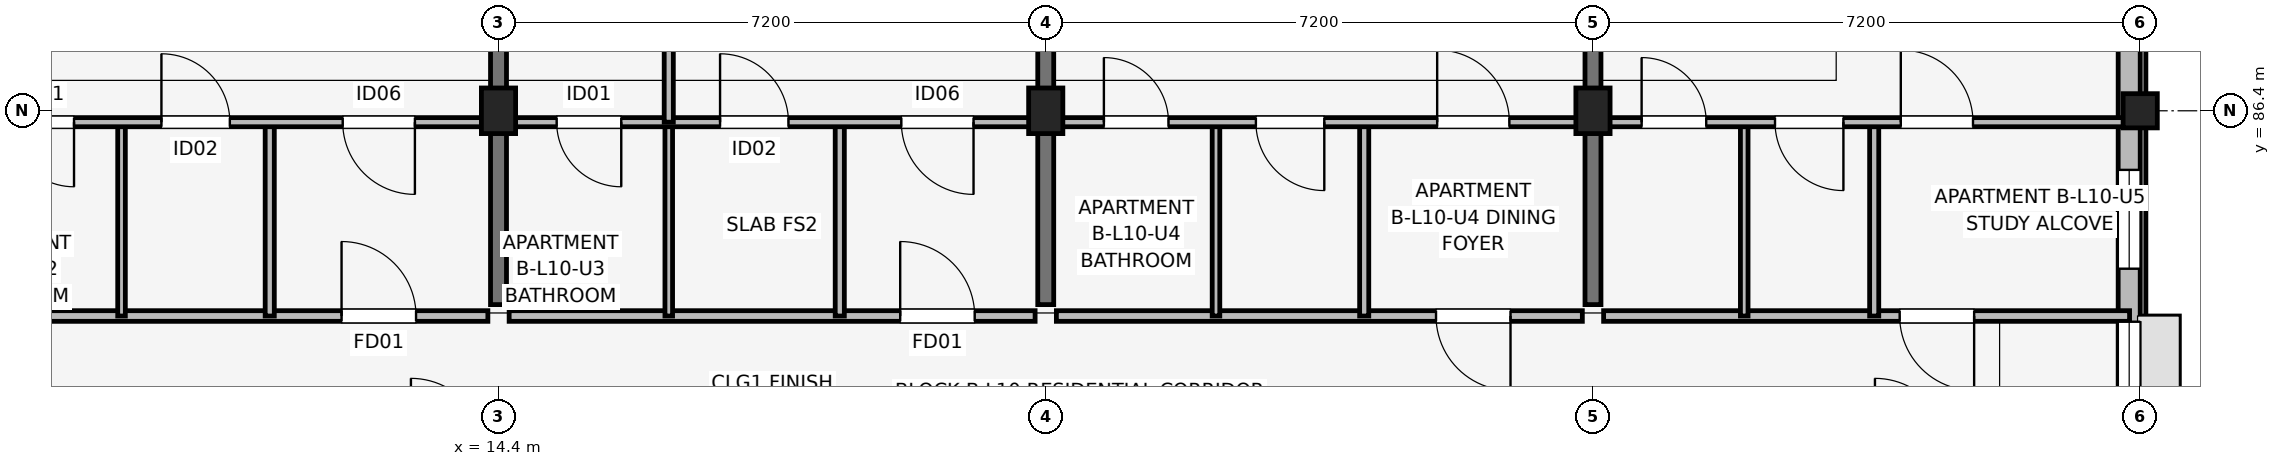
"""IFC4 building model, lengths in metres.
Left out: names, types, materials, properties, quantities, classifications, styles, units other than length and angle.
Written with IfcOpenShell. Run it as: python <this file> out.ifc"""

import sys

from ifc_helpers import new_model, si_unit, direction, frame, frame_2d, origin, origin_2d, place, context, subcontext, project, spatial, rectangle, extrude, element, fill, save


model = new_model("IFC4")
c1 = context("Model", 3, precision=1e-05, world=origin(), true_north=direction((0.0, 1.0)))
c2 = subcontext(c1, "Body", "Model", "MODEL_VIEW")
j1 = project(units=[si_unit("LENGTHUNIT", "METRE"), si_unit("PLANEANGLEUNIT", "RADIAN")], contexts=[c1])
p1 = place(None, origin())
s1 = spatial("IfcSite", under=j1, at=p1, CompositionType="ELEMENT")
p2 = place(p1, origin())
s2 = spatial("IfcBuilding", under=s1, at=p2, CompositionType="ELEMENT")
p3 = place(p2, frame((0.0, 0.0, 33.9)))
s3 = spatial("IfcBuildingStorey", under=s2, at=p3, CompositionType="ELEMENT", Elevation=33.9)
for number, where, z_axis, x_axis in (
    (1, (14.4, 86.4, 0.0), (0.0, 0.0, 1.0), (1.0, 0.0, 0.0)),
    (2, (21.6, 86.4, 0.0), (0.0, 0.0, 1.0), (1.0, 0.0, 0.0)),
    (3, (28.8, 86.4, 0.0), (0.0, 0.0, 1.0), (1.0, 0.0, 0.0)),
):
    element("IfcColumn", number, at=place(p3, frame(where, z_axis=z_axis, x_axis=x_axis)), inside=s3, PredefinedType="COLUMN", context=c2, shape_type="SweptSolid", body=[
        extrude(rectangle(XDim=0.45, YDim=0.6, at=origin_2d()), origin(), (0.0, 0.0, 1.0), 3.15),
    ])
p4 = place(p3, frame((36.0, 86.4, 0.0), z_axis=(0.0, 0.0, 1.0), x_axis=(1.0, 0.0, 0.0)))
e4 = element("IfcColumn", 4, at=p4, inside=s3, PredefinedType="COLUMN", context=c2, shape_type="SweptSolid", body=[
    extrude(rectangle(XDim=0.45, YDim=0.45, at=origin_2d()), origin(), (0.0, 0.0, 1.0), 3.15),
])
for number, where, z_axis, x_axis in (
    (5, (14.4, 83.85, 0.0), (0.0, 0.0, 1.0), (0.0, 1.0, 0.0)),
    (6, (21.6, 83.85, 0.0), (0.0, 0.0, 1.0), (0.0, 1.0, 0.0)),
    (7, (28.8, 83.85, 0.0), (0.0, 0.0, 1.0), (0.0, 1.0, 0.0)),
):
    element("IfcWall", number, at=place(p3, frame(where, z_axis=z_axis, x_axis=x_axis)), inside=s3, PredefinedType="SHEAR", context=c2, shape_type="SweptSolid", body=[
        extrude(rectangle(XDim=6.4, YDim=0.21, at=frame_2d((3.2, 0.0))), origin(), (0.0, 0.0, 1.0), 3.15),
    ])
p5 = place(p3, frame((35.855, 74.4, 0.0), z_axis=(0.0, 0.0, 1.0), x_axis=(0.0, 1.0, 0.0)))
e8 = element("IfcWall", 8, at=p5, inside=s3, PredefinedType="SOLIDWALL", context=c2, shape_type="SweptSolid", body=[
    extrude(rectangle(XDim=13.8, YDim=0.29, at=frame_2d((6.9, 0.0))), origin(), (0.0, 0.0, 1.0), 2.48),
])
p6 = place(p5, frame((7.575, 0.0, 1.05)))
e9 = element("IfcOpeningElement", 9, at=p6, cuts=e8, PredefinedType="OPENING", context=c2, shape_type="SweptSolid", body=[
    extrude(rectangle(XDim=1.65, YDim=1.15, at=frame_2d((0.825, 0.575))), frame((0.0, 0.155, 0.0), z_axis=(0.0, -1.0, 0.0), x_axis=(1.0, 0.0, 0.0)), (0.0, 0.0, 1.0), 0.31),
])
p7 = place(p5, frame((9.923, 0.0, 0.75)))
e10 = element("IfcOpeningElement", 10, at=p7, cuts=e8, PredefinedType="OPENING", context=c2, shape_type="SweptSolid", body=[
    extrude(rectangle(XDim=1.3, YDim=1.55, at=frame_2d((0.65, 0.775))), frame((0.0, 0.155, 0.0), z_axis=(0.0, -1.0, 0.0), x_axis=(1.0, 0.0, 0.0)), (0.0, 0.0, 1.0), 0.31),
])
p8 = place(p3, frame((7.34, 83.7, 0.0), z_axis=(0.0, 0.0, 1.0), x_axis=(1.0, 0.0, 0.0)))
e11 = element("IfcWall", 11, at=p8, inside=s3, PredefinedType="PARTITIONING", context=c2, shape_type="SweptSolid", body=[
    extrude(rectangle(XDim=6.92, YDim=0.14, at=frame_2d((3.46, 0.0))), origin(), (0.0, 0.0, 1.0), 2.38),
])
p9 = place(p8, frame((4.995, 0.0, 0.0)))
e12 = element("IfcOpeningElement", 12, at=p9, cuts=e11, PredefinedType="OPENING", context=c2, shape_type="SweptSolid", body=[
    extrude(rectangle(XDim=0.98, YDim=2.1, at=frame_2d((0.49, 1.05))), frame((0.0, 0.08, 0.0), z_axis=(0.0, -1.0, 0.0), x_axis=(1.0, 0.0, 0.0)), (0.0, 0.0, 1.0), 0.16),
])
p10 = place(p3, frame((9.44, 83.7, 0.0), z_axis=(0.0, 0.0, 1.0), x_axis=(0.0, 1.0, 0.0)))
e13 = element("IfcWall", 13, at=p10, inside=s3, PredefinedType="PARTITIONING", context=c2, shape_type="SweptSolid", body=[
    extrude(rectangle(XDim=2.55, YDim=0.1, at=frame_2d((1.275, 0.0))), origin(), (0.0, 0.0, 1.0), 2.38),
])
p11 = place(p3, frame((11.39, 83.7, 0.0), z_axis=(0.0, 0.0, 1.0), x_axis=(0.0, 1.0, 0.0)))
e14 = element("IfcWall", 14, at=p11, inside=s3, PredefinedType="PARTITIONING", context=c2, shape_type="SweptSolid", body=[
    extrude(rectangle(XDim=2.55, YDim=0.12, at=frame_2d((1.275, 0.0))), origin(), (0.0, 0.0, 1.0), 2.38),
])
p12 = place(p3, frame((7.34, 86.25, 0.0), z_axis=(0.0, 0.0, 1.0), x_axis=(1.0, 0.0, 0.0)))
e15 = element("IfcWall", 15, at=p12, inside=s3, PredefinedType="PARTITIONING", context=c2, shape_type="SweptSolid", body=[
    extrude(rectangle(XDim=6.92, YDim=0.12, at=frame_2d((3.46, 0.0))), origin(), (0.0, 0.0, 1.0), 2.38),
])
p13 = place(p12, frame((1.475, 0.0, 0.0), z_axis=(0.0, 0.0, 1.0), x_axis=(-1.0, 0.0, 0.0)))
e16 = element("IfcOpeningElement", 16, at=p13, cuts=e15, PredefinedType="OPENING", context=c2, shape_type="SweptSolid", body=[
    extrude(rectangle(XDim=0.85, YDim=2.08, at=frame_2d((0.425, 1.04))), frame((0.0, 0.07, 0.0), z_axis=(0.0, -1.0, 0.0), x_axis=(1.0, 0.0, 0.0)), (0.0, 0.0, 1.0), 0.14),
])
p14 = place(p12, frame((2.625, 0.0, 0.0)))
e17 = element("IfcOpeningElement", 17, at=p14, cuts=e15, PredefinedType="OPENING", context=c2, shape_type="SweptSolid", body=[
    extrude(rectangle(XDim=0.9, YDim=2.08, at=frame_2d((0.45, 1.04))), frame((0.0, 0.07, 0.0), z_axis=(0.0, -1.0, 0.0), x_axis=(1.0, 0.0, 0.0)), (0.0, 0.0, 1.0), 0.14),
])
p15 = place(p12, frame((5.96, 0.0, 0.0), z_axis=(0.0, 0.0, 1.0), x_axis=(-1.0, 0.0, 0.0)))
e18 = element("IfcOpeningElement", 18, at=p15, cuts=e15, PredefinedType="OPENING", context=c2, shape_type="SweptSolid", body=[
    extrude(rectangle(XDim=0.95, YDim=2.08, at=frame_2d((0.475, 1.04))), frame((0.0, 0.07, 0.0), z_axis=(0.0, -1.0, 0.0), x_axis=(1.0, 0.0, 0.0)), (0.0, 0.0, 1.0), 0.14),
])
p16 = place(p3, frame((14.54, 83.7, 0.0), z_axis=(0.0, 0.0, 1.0), x_axis=(1.0, 0.0, 0.0)))
e19 = element("IfcWall", 19, at=p16, inside=s3, PredefinedType="PARTITIONING", context=c2, shape_type="SweptSolid", body=[
    extrude(rectangle(XDim=6.92, YDim=0.14, at=frame_2d((3.46, 0.0))), origin(), (0.0, 0.0, 1.0), 2.38),
])
p17 = place(p16, frame((5.145, 0.0, 0.0)))
e20 = element("IfcOpeningElement", 20, at=p17, cuts=e19, PredefinedType="OPENING", context=c2, shape_type="SweptSolid", body=[
    extrude(rectangle(XDim=0.98, YDim=2.1, at=frame_2d((0.49, 1.05))), frame((0.0, 0.08, 0.0), z_axis=(0.0, -1.0, 0.0), x_axis=(1.0, 0.0, 0.0)), (0.0, 0.0, 1.0), 0.16),
])
p18 = place(p3, frame((16.64, 83.7, 0.0), z_axis=(0.0, 0.0, 1.0), x_axis=(0.0, 1.0, 0.0)))
e21 = element("IfcWall", 21, at=p18, inside=s3, PredefinedType="PARTITIONING", context=c2, shape_type="SweptSolid", body=[
    extrude(rectangle(XDim=2.55, YDim=0.1, at=frame_2d((1.275, 0.0))), origin(), (0.0, 0.0, 1.0), 2.38),
])
p19 = place(p3, frame((18.89, 83.7, 0.0), z_axis=(0.0, 0.0, 1.0), x_axis=(0.0, 1.0, 0.0)))
e22 = element("IfcWall", 22, at=p19, inside=s3, PredefinedType="PARTITIONING", context=c2, shape_type="SweptSolid", body=[
    extrude(rectangle(XDim=2.55, YDim=0.12, at=frame_2d((1.275, 0.0))), origin(), (0.0, 0.0, 1.0), 2.38),
])
p20 = place(p3, frame((14.54, 86.25, 0.0), z_axis=(0.0, 0.0, 1.0), x_axis=(1.0, 0.0, 0.0)))
e23 = element("IfcWall", 23, at=p20, inside=s3, PredefinedType="PARTITIONING", context=c2, shape_type="SweptSolid", body=[
    extrude(rectangle(XDim=6.92, YDim=0.12, at=frame_2d((3.46, 0.0))), origin(), (0.0, 0.0, 1.0), 2.38),
])
p21 = place(p20, frame((1.475, 0.0, 0.0), z_axis=(0.0, 0.0, 1.0), x_axis=(-1.0, 0.0, 0.0)))
e24 = element("IfcOpeningElement", 24, at=p21, cuts=e23, PredefinedType="OPENING", context=c2, shape_type="SweptSolid", body=[
    extrude(rectangle(XDim=0.85, YDim=2.08, at=frame_2d((0.425, 1.04))), frame((0.0, 0.07, 0.0), z_axis=(0.0, -1.0, 0.0), x_axis=(1.0, 0.0, 0.0)), (0.0, 0.0, 1.0), 0.14),
])
p22 = place(p20, frame((2.775, 0.0, 0.0)))
e25 = element("IfcOpeningElement", 25, at=p22, cuts=e23, PredefinedType="OPENING", context=c2, shape_type="SweptSolid", body=[
    extrude(rectangle(XDim=0.9, YDim=2.08, at=frame_2d((0.45, 1.04))), frame((0.0, 0.07, 0.0), z_axis=(0.0, -1.0, 0.0), x_axis=(1.0, 0.0, 0.0)), (0.0, 0.0, 1.0), 0.14),
])
p23 = place(p20, frame((6.11, 0.0, 0.0), z_axis=(0.0, 0.0, 1.0), x_axis=(-1.0, 0.0, 0.0)))
e26 = element("IfcOpeningElement", 26, at=p23, cuts=e23, PredefinedType="OPENING", context=c2, shape_type="SweptSolid", body=[
    extrude(rectangle(XDim=0.95, YDim=2.08, at=frame_2d((0.475, 1.04))), frame((0.0, 0.07, 0.0), z_axis=(0.0, -1.0, 0.0), x_axis=(1.0, 0.0, 0.0)), (0.0, 0.0, 1.0), 0.14),
])
p24 = place(p3, frame((16.64, 86.25, 0.0), z_axis=(0.0, 0.0, 1.0), x_axis=(0.0, 1.0, 0.0)))
e27 = element("IfcWall", 27, at=p24, inside=s3, PredefinedType="PARTITIONING", context=c2, shape_type="SweptSolid", body=[
    extrude(rectangle(XDim=4.05, YDim=0.12, at=frame_2d((2.025, 0.0))), origin(), (0.0, 0.0, 1.0), 2.38),
])
p25 = place(p24, frame((1.575, 0.0, 0.0)))
e28 = element("IfcOpeningElement", 28, at=p25, cuts=e27, PredefinedType="OPENING", context=c2, shape_type="SweptSolid", body=[
    extrude(rectangle(XDim=0.9, YDim=2.08, at=frame_2d((0.45, 1.04))), frame((0.0, 0.07, 0.0), z_axis=(0.0, -1.0, 0.0), x_axis=(1.0, 0.0, 0.0)), (0.0, 0.0, 1.0), 0.14),
])
p26 = place(p3, frame((21.74, 83.7, 0.0), z_axis=(0.0, 0.0, 1.0), x_axis=(1.0, 0.0, 0.0)))
e29 = element("IfcWall", 29, at=p26, inside=s3, PredefinedType="PARTITIONING", context=c2, shape_type="SweptSolid", body=[
    extrude(rectangle(XDim=6.92, YDim=0.14, at=frame_2d((3.46, 0.0))), origin(), (0.0, 0.0, 1.0), 2.38),
])
p27 = place(p26, frame((5.975, 0.0, 0.0), z_axis=(0.0, 0.0, 1.0), x_axis=(-1.0, 0.0, 0.0)))
e30 = element("IfcOpeningElement", 30, at=p27, cuts=e29, PredefinedType="OPENING", context=c2, shape_type="SweptSolid", body=[
    extrude(rectangle(XDim=0.98, YDim=2.1, at=frame_2d((0.49, 1.05))), frame((0.0, 0.08, 0.0), z_axis=(0.0, -1.0, 0.0), x_axis=(1.0, 0.0, 0.0)), (0.0, 0.0, 1.0), 0.16),
])
p28 = place(p3, frame((23.84, 83.7, 0.0), z_axis=(0.0, 0.0, 1.0), x_axis=(0.0, 1.0, 0.0)))
e31 = element("IfcWall", 31, at=p28, inside=s3, PredefinedType="PARTITIONING", context=c2, shape_type="SweptSolid", body=[
    extrude(rectangle(XDim=2.55, YDim=0.1, at=frame_2d((1.275, 0.0))), origin(), (0.0, 0.0, 1.0), 2.38),
])
p29 = place(p3, frame((25.79, 83.7, 0.0), z_axis=(0.0, 0.0, 1.0), x_axis=(0.0, 1.0, 0.0)))
e32 = element("IfcWall", 32, at=p29, inside=s3, PredefinedType="PARTITIONING", context=c2, shape_type="SweptSolid", body=[
    extrude(rectangle(XDim=2.55, YDim=0.12, at=frame_2d((1.275, 0.0))), origin(), (0.0, 0.0, 1.0), 2.38),
])
p30 = place(p3, frame((21.74, 86.25, 0.0), z_axis=(0.0, 0.0, 1.0), x_axis=(1.0, 0.0, 0.0)))
e33 = element("IfcWall", 33, at=p30, inside=s3, PredefinedType="PARTITIONING", context=c2, shape_type="SweptSolid", body=[
    extrude(rectangle(XDim=6.92, YDim=0.12, at=frame_2d((3.46, 0.0))), origin(), (0.0, 0.0, 1.0), 2.38),
])
p31 = place(p30, frame((0.625, 0.0, 0.0)))
e34 = element("IfcOpeningElement", 34, at=p31, cuts=e33, PredefinedType="OPENING", context=c2, shape_type="SweptSolid", body=[
    extrude(rectangle(XDim=0.85, YDim=2.08, at=frame_2d((0.425, 1.04))), frame((0.0, 0.07, 0.0), z_axis=(0.0, -1.0, 0.0), x_axis=(1.0, 0.0, 0.0)), (0.0, 0.0, 1.0), 0.14),
])
p32 = place(p30, frame((3.525, 0.0, 0.0), z_axis=(0.0, 0.0, 1.0), x_axis=(-1.0, 0.0, 0.0)))
e35 = element("IfcOpeningElement", 35, at=p32, cuts=e33, PredefinedType="OPENING", context=c2, shape_type="SweptSolid", body=[
    extrude(rectangle(XDim=0.9, YDim=2.08, at=frame_2d((0.45, 1.04))), frame((0.0, 0.07, 0.0), z_axis=(0.0, -1.0, 0.0), x_axis=(1.0, 0.0, 0.0)), (0.0, 0.0, 1.0), 0.14),
])
p33 = place(p30, frame((5.01, 0.0, 0.0)))
e36 = element("IfcOpeningElement", 36, at=p33, cuts=e33, PredefinedType="OPENING", context=c2, shape_type="SweptSolid", body=[
    extrude(rectangle(XDim=0.95, YDim=2.08, at=frame_2d((0.475, 1.04))), frame((0.0, 0.07, 0.0), z_axis=(0.0, -1.0, 0.0), x_axis=(1.0, 0.0, 0.0)), (0.0, 0.0, 1.0), 0.14),
])
p34 = place(p3, frame((28.94, 83.7, 0.0), z_axis=(0.0, 0.0, 1.0), x_axis=(1.0, 0.0, 0.0)))
e37 = element("IfcWall", 37, at=p34, inside=s3, PredefinedType="PARTITIONING", context=c2, shape_type="SweptSolid", body=[
    extrude(rectangle(XDim=6.92, YDim=0.14, at=frame_2d((3.46, 0.0))), origin(), (0.0, 0.0, 1.0), 2.38),
])
p35 = place(p34, frame((4.875, 0.0, 0.0), z_axis=(0.0, 0.0, 1.0), x_axis=(-1.0, 0.0, 0.0)))
e38 = element("IfcOpeningElement", 38, at=p35, cuts=e37, PredefinedType="OPENING", context=c2, shape_type="SweptSolid", body=[
    extrude(rectangle(XDim=0.98, YDim=2.1, at=frame_2d((0.49, 1.05))), frame((0.0, 0.08, 0.0), z_axis=(0.0, -1.0, 0.0), x_axis=(1.0, 0.0, 0.0)), (0.0, 0.0, 1.0), 0.16),
])
p36 = place(p3, frame((30.79, 83.7, 0.0), z_axis=(0.0, 0.0, 1.0), x_axis=(0.0, 1.0, 0.0)))
e39 = element("IfcWall", 39, at=p36, inside=s3, PredefinedType="PARTITIONING", context=c2, shape_type="SweptSolid", body=[
    extrude(rectangle(XDim=2.55, YDim=0.1, at=frame_2d((1.275, 0.0))), origin(), (0.0, 0.0, 1.0), 2.38),
])
p37 = place(p3, frame((32.5, 83.7, 0.0), z_axis=(0.0, 0.0, 1.0), x_axis=(0.0, 1.0, 0.0)))
e40 = element("IfcWall", 40, at=p37, inside=s3, PredefinedType="PARTITIONING", context=c2, shape_type="SweptSolid", body=[
    extrude(rectangle(XDim=2.55, YDim=0.12, at=frame_2d((1.275, 0.0))), origin(), (0.0, 0.0, 1.0), 2.38),
])
p38 = place(p3, frame((28.94, 86.25, 0.0), z_axis=(0.0, 0.0, 1.0), x_axis=(1.0, 0.0, 0.0)))
e41 = element("IfcWall", 41, at=p38, inside=s3, PredefinedType="PARTITIONING", context=c2, shape_type="SweptSolid", body=[
    extrude(rectangle(XDim=6.92, YDim=0.12, at=frame_2d((3.46, 0.0))), origin(), (0.0, 0.0, 1.0), 2.38),
])
p39 = place(p38, frame((0.5, 0.0, 0.0)))
e42 = element("IfcOpeningElement", 42, at=p39, cuts=e41, PredefinedType="OPENING", context=c2, shape_type="SweptSolid", body=[
    extrude(rectangle(XDim=0.85, YDim=2.08, at=frame_2d((0.425, 1.04))), frame((0.0, 0.07, 0.0), z_axis=(0.0, -1.0, 0.0), x_axis=(1.0, 0.0, 0.0)), (0.0, 0.0, 1.0), 0.14),
])
p40 = place(p38, frame((3.155, 0.0, 0.0), z_axis=(0.0, 0.0, 1.0), x_axis=(-1.0, 0.0, 0.0)))
e43 = element("IfcOpeningElement", 43, at=p40, cuts=e41, PredefinedType="OPENING", context=c2, shape_type="SweptSolid", body=[
    extrude(rectangle(XDim=0.9, YDim=2.08, at=frame_2d((0.45, 1.04))), frame((0.0, 0.07, 0.0), z_axis=(0.0, -1.0, 0.0), x_axis=(1.0, 0.0, 0.0)), (0.0, 0.0, 1.0), 0.14),
])
p41 = place(p38, frame((3.91, 0.0, 0.0)))
e44 = element("IfcOpeningElement", 44, at=p41, cuts=e41, PredefinedType="OPENING", context=c2, shape_type="SweptSolid", body=[
    extrude(rectangle(XDim=0.95, YDim=2.08, at=frame_2d((0.475, 1.04))), frame((0.0, 0.07, 0.0), z_axis=(0.0, -1.0, 0.0), x_axis=(1.0, 0.0, 0.0)), (0.0, 0.0, 1.0), 0.14),
])
p42 = place(p6, origin())
e45 = element("IfcWindow", 45, at=p42, inside=s3, PartitioningType="SINGLE_PANEL", PredefinedType="WINDOW", context=c2, shape_type="SweptSolid", body=[
    extrude(rectangle(XDim=1.65, YDim=1.15, at=frame_2d((0.825, 0.575))), frame((0.0, 0.03, 0.0), z_axis=(0.0, -1.0, 0.0), x_axis=(1.0, 0.0, 0.0)), (0.0, 0.0, 1.0), 0.06),
])
fill(e9, e45)
p43 = place(p7, origin())
e46 = element("IfcWindow", 46, at=p43, inside=s3, PartitioningType="SINGLE_PANEL", PredefinedType="WINDOW", context=c2, shape_type="SweptSolid", body=[
    extrude(rectangle(XDim=1.3, YDim=1.55, at=frame_2d((0.65, 0.775))), frame((0.0, 0.03, 0.0), z_axis=(0.0, -1.0, 0.0), x_axis=(1.0, 0.0, 0.0)), (0.0, 0.0, 1.0), 0.06),
])
fill(e10, e46)
p44 = place(p9, origin())
e47 = element("IfcDoor", 47, at=p44, inside=s3, OperationType="SINGLE_SWING_LEFT", PredefinedType="DOOR", context=c2, shape_type="SweptSolid", body=[
    extrude(rectangle(XDim=0.98, YDim=2.1, at=frame_2d((0.49, 1.05))), frame((0.0, 0.025, 0.0), z_axis=(0.0, -1.0, 0.0), x_axis=(1.0, 0.0, 0.0)), (0.0, 0.0, 1.0), 0.05),
])
fill(e12, e47)
p45 = place(p13, origin())
e48 = element("IfcDoor", 48, at=p45, inside=s3, OperationType="SINGLE_SWING_RIGHT", PredefinedType="DOOR", context=c2, shape_type="SweptSolid", body=[
    extrude(rectangle(XDim=0.85, YDim=2.08, at=frame_2d((0.425, 1.04))), frame((0.0, 0.025, 0.0), z_axis=(0.0, -1.0, 0.0), x_axis=(1.0, 0.0, 0.0)), (0.0, 0.0, 1.0), 0.05),
])
fill(e16, e48)
p46 = place(p14, origin())
e49 = element("IfcDoor", 49, at=p46, inside=s3, OperationType="SINGLE_SWING_LEFT", PredefinedType="DOOR", context=c2, shape_type="SweptSolid", body=[
    extrude(rectangle(XDim=0.9, YDim=2.08, at=frame_2d((0.45, 1.04))), frame((0.0, 0.025, 0.0), z_axis=(0.0, -1.0, 0.0), x_axis=(1.0, 0.0, 0.0)), (0.0, 0.0, 1.0), 0.05),
])
fill(e17, e49)
p47 = place(p15, origin())
e50 = element("IfcDoor", 50, at=p47, inside=s3, OperationType="SINGLE_SWING_RIGHT", PredefinedType="DOOR", context=c2, shape_type="SweptSolid", body=[
    extrude(rectangle(XDim=0.95, YDim=2.08, at=frame_2d((0.475, 1.04))), frame((0.0, 0.025, 0.0), z_axis=(0.0, -1.0, 0.0), x_axis=(1.0, 0.0, 0.0)), (0.0, 0.0, 1.0), 0.05),
])
fill(e18, e50)
p48 = place(p17, origin())
e51 = element("IfcDoor", 51, at=p48, inside=s3, OperationType="SINGLE_SWING_LEFT", PredefinedType="DOOR", context=c2, shape_type="SweptSolid", body=[
    extrude(rectangle(XDim=0.98, YDim=2.1, at=frame_2d((0.49, 1.05))), frame((0.0, 0.025, 0.0), z_axis=(0.0, -1.0, 0.0), x_axis=(1.0, 0.0, 0.0)), (0.0, 0.0, 1.0), 0.05),
])
fill(e20, e51)
p49 = place(p21, origin())
e52 = element("IfcDoor", 52, at=p49, inside=s3, OperationType="SINGLE_SWING_RIGHT", PredefinedType="DOOR", context=c2, shape_type="SweptSolid", body=[
    extrude(rectangle(XDim=0.85, YDim=2.08, at=frame_2d((0.425, 1.04))), frame((0.0, 0.025, 0.0), z_axis=(0.0, -1.0, 0.0), x_axis=(1.0, 0.0, 0.0)), (0.0, 0.0, 1.0), 0.05),
])
fill(e24, e52)
p50 = place(p22, origin())
e53 = element("IfcDoor", 53, at=p50, inside=s3, OperationType="SINGLE_SWING_LEFT", PredefinedType="DOOR", context=c2, shape_type="SweptSolid", body=[
    extrude(rectangle(XDim=0.9, YDim=2.08, at=frame_2d((0.45, 1.04))), frame((0.0, 0.025, 0.0), z_axis=(0.0, -1.0, 0.0), x_axis=(1.0, 0.0, 0.0)), (0.0, 0.0, 1.0), 0.05),
])
fill(e25, e53)
p51 = place(p23, origin())
e54 = element("IfcDoor", 54, at=p51, inside=s3, OperationType="SINGLE_SWING_RIGHT", PredefinedType="DOOR", context=c2, shape_type="SweptSolid", body=[
    extrude(rectangle(XDim=0.95, YDim=2.08, at=frame_2d((0.475, 1.04))), frame((0.0, 0.025, 0.0), z_axis=(0.0, -1.0, 0.0), x_axis=(1.0, 0.0, 0.0)), (0.0, 0.0, 1.0), 0.05),
])
fill(e26, e54)
p52 = place(p27, origin())
e55 = element("IfcDoor", 55, at=p52, inside=s3, OperationType="SINGLE_SWING_RIGHT", PredefinedType="DOOR", context=c2, shape_type="SweptSolid", body=[
    extrude(rectangle(XDim=0.98, YDim=2.1, at=frame_2d((0.49, 1.05))), frame((0.0, 0.025, 0.0), z_axis=(0.0, -1.0, 0.0), x_axis=(1.0, 0.0, 0.0)), (0.0, 0.0, 1.0), 0.05),
])
fill(e30, e55)
p53 = place(p31, origin())
e56 = element("IfcDoor", 56, at=p53, inside=s3, OperationType="SINGLE_SWING_LEFT", PredefinedType="DOOR", context=c2, shape_type="SweptSolid", body=[
    extrude(rectangle(XDim=0.85, YDim=2.08, at=frame_2d((0.425, 1.04))), frame((0.0, 0.025, 0.0), z_axis=(0.0, -1.0, 0.0), x_axis=(1.0, 0.0, 0.0)), (0.0, 0.0, 1.0), 0.05),
])
fill(e34, e56)
p54 = place(p32, origin())
e57 = element("IfcDoor", 57, at=p54, inside=s3, OperationType="SINGLE_SWING_RIGHT", PredefinedType="DOOR", context=c2, shape_type="SweptSolid", body=[
    extrude(rectangle(XDim=0.9, YDim=2.08, at=frame_2d((0.45, 1.04))), frame((0.0, 0.025, 0.0), z_axis=(0.0, -1.0, 0.0), x_axis=(1.0, 0.0, 0.0)), (0.0, 0.0, 1.0), 0.05),
])
fill(e35, e57)
p55 = place(p33, origin())
e58 = element("IfcDoor", 58, at=p55, inside=s3, OperationType="SINGLE_SWING_LEFT", PredefinedType="DOOR", context=c2, shape_type="SweptSolid", body=[
    extrude(rectangle(XDim=0.95, YDim=2.08, at=frame_2d((0.475, 1.04))), frame((0.0, 0.025, 0.0), z_axis=(0.0, -1.0, 0.0), x_axis=(1.0, 0.0, 0.0)), (0.0, 0.0, 1.0), 0.05),
])
fill(e36, e58)
p56 = place(p35, origin())
e59 = element("IfcDoor", 59, at=p56, inside=s3, OperationType="SINGLE_SWING_RIGHT", PredefinedType="DOOR", context=c2, shape_type="SweptSolid", body=[
    extrude(rectangle(XDim=0.98, YDim=2.1, at=frame_2d((0.49, 1.05))), frame((0.0, 0.025, 0.0), z_axis=(0.0, -1.0, 0.0), x_axis=(1.0, 0.0, 0.0)), (0.0, 0.0, 1.0), 0.05),
])
fill(e38, e59)
p57 = place(p39, origin())
e60 = element("IfcDoor", 60, at=p57, inside=s3, OperationType="SINGLE_SWING_LEFT", PredefinedType="DOOR", context=c2, shape_type="SweptSolid", body=[
    extrude(rectangle(XDim=0.85, YDim=2.08, at=frame_2d((0.425, 1.04))), frame((0.0, 0.025, 0.0), z_axis=(0.0, -1.0, 0.0), x_axis=(1.0, 0.0, 0.0)), (0.0, 0.0, 1.0), 0.05),
])
fill(e42, e60)
p58 = place(p40, origin())
e61 = element("IfcDoor", 61, at=p58, inside=s3, OperationType="SINGLE_SWING_RIGHT", PredefinedType="DOOR", context=c2, shape_type="SweptSolid", body=[
    extrude(rectangle(XDim=0.9, YDim=2.08, at=frame_2d((0.45, 1.04))), frame((0.0, 0.025, 0.0), z_axis=(0.0, -1.0, 0.0), x_axis=(1.0, 0.0, 0.0)), (0.0, 0.0, 1.0), 0.05),
])
fill(e43, e61)
p59 = place(p41, origin())
e62 = element("IfcDoor", 62, at=p59, inside=s3, OperationType="SINGLE_SWING_LEFT", PredefinedType="DOOR", context=c2, shape_type="SweptSolid", body=[
    extrude(rectangle(XDim=0.95, YDim=2.08, at=frame_2d((0.475, 1.04))), frame((0.0, 0.025, 0.0), z_axis=(0.0, -1.0, 0.0), x_axis=(1.0, 0.0, 0.0)), (0.0, 0.0, 1.0), 0.05),
])
fill(e44, e62)
save(model, sys.argv[1])
